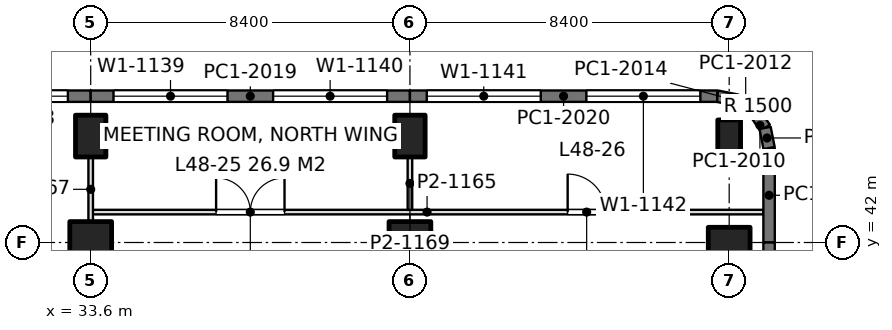
"""IFC4 building model, lengths in metres.
Left out: names, types, materials, properties, quantities, classifications, styles, units other than length and angle.
Written with IfcOpenShell. Run it as: python <this file> out.ifc"""

import sys

from ifc_helpers import new_model, si_unit, direction, frame, frame_2d, origin, origin_2d, place, context, subcontext, project, spatial, rectangle, extrude, element, fill, save


model = new_model("IFC4")
c1 = context("Model", 3, precision=1e-05, world=origin(), true_north=direction((0.0, 1.0)))
c2 = subcontext(c1, "Body", "Model", "MODEL_VIEW")
j1 = project(units=[si_unit("LENGTHUNIT", "METRE"), si_unit("PLANEANGLEUNIT", "RADIAN")], contexts=[c1])
p1 = place(None, origin())
s1 = spatial("IfcSite", under=j1, at=p1, CompositionType="ELEMENT")
p2 = place(p1, origin())
s2 = spatial("IfcBuilding", under=s1, at=p2, CompositionType="ELEMENT")
p3 = place(p2, frame((0.0, 0.0, 211.2)))
s3 = spatial("IfcBuildingStorey", under=s2, at=p3, CompositionType="ELEMENT", Elevation=211.2)
p4 = place(p3, frame((33.6, 42.0, 0.0), z_axis=(0.0, 0.0, 1.0), x_axis=(1.0, 0.0, 0.0)))
e1 = element("IfcColumn", 1, at=p4, inside=s3, PredefinedType="COLUMN", context=c2, shape_type="SweptSolid", body=[
    extrude(rectangle(XDim=1.1, YDim=1.1, at=origin_2d()), origin(), (0.0, 0.0, 1.0), 4.2),
])
p5 = place(p3, frame((33.6, 44.8, 0.0), z_axis=(0.0, 0.0, 1.0), x_axis=(1.0, 0.0, 0.0)))
e2 = element("IfcColumn", 2, at=p5, inside=s3, PredefinedType="COLUMN", context=c2, shape_type="SweptSolid", body=[
    extrude(rectangle(XDim=0.8, YDim=1.1, at=origin_2d()), origin(), (0.0, 0.0, 1.0), 4.2),
])
p6 = place(p3, frame((42.0, 42.0, 0.0), z_axis=(0.0, 0.0, 1.0), x_axis=(1.0, 0.0, 0.0)))
e3 = element("IfcColumn", 3, at=p6, inside=s3, PredefinedType="COLUMN", context=c2, shape_type="SweptSolid", body=[
    extrude(rectangle(XDim=1.1, YDim=1.1, at=origin_2d()), origin(), (0.0, 0.0, 1.0), 4.2),
])
for number, where, z_axis, x_axis in (
    (4, (42.0, 44.8, 0.0), (0.0, 0.0, 1.0), (1.0, 0.0, 0.0)),
    (5, (50.4, 42.0, 0.0), (0.0, 0.0, 1.0), (0.0, 1.0, 0.0)),
):
    element("IfcColumn", number, at=place(p3, frame(where, z_axis=z_axis, x_axis=x_axis)), inside=s3, PredefinedType="COLUMN", context=c2, shape_type="SweptSolid", body=[
        extrude(rectangle(XDim=0.8, YDim=1.1, at=origin_2d()), origin(), (0.0, 0.0, 1.0), 4.2),
    ])
p7 = place(p3, frame((50.4, 44.8, 0.0), z_axis=(0.0, 0.0, 1.0), x_axis=(1.0, 0.0, 0.0)))
e6 = element("IfcColumn", 6, at=p7, inside=s3, PredefinedType="COLUMN", context=c2, shape_type="SweptSolid", body=[
    extrude(rectangle(XDim=0.6, YDim=0.85, at=origin_2d()), origin(), (0.0, 0.0, 1.0), 4.2),
])
p8 = place(p3, frame((25.2, 45.85, 0.0), z_axis=(0.0, 0.0, 1.0), x_axis=(1.0, 0.0, 0.0)))
e7 = element("IfcWall", 7, at=p8, inside=s3, PredefinedType="SOLIDWALL", context=c2, shape_type="SweptSolid", body=[
    extrude(rectangle(XDim=8.4, YDim=0.3, at=frame_2d((4.2, 0.0))), origin(), (0.0, 0.0, 1.0), 4.05),
])
p9 = place(p8, frame((0.6, 0.0, 0.9)))
e8 = element("IfcOpeningElement", 8, at=p9, cuts=e7, PredefinedType="OPENING", context=c2, shape_type="SweptSolid", body=[
    extrude(rectangle(XDim=3.0, YDim=1.9, at=frame_2d((1.5, 0.95))), frame((0.0, 0.16, 0.0), z_axis=(0.0, -1.0, 0.0), x_axis=(1.0, 0.0, 0.0)), (0.0, 0.0, 1.0), 0.32),
])
p10 = place(p8, frame((4.8, 0.0, 0.9)))
e9 = element("IfcOpeningElement", 9, at=p10, cuts=e7, PredefinedType="OPENING", context=c2, shape_type="SweptSolid", body=[
    extrude(rectangle(XDim=3.0, YDim=1.9, at=frame_2d((1.5, 0.95))), frame((0.0, 0.16, 0.0), z_axis=(0.0, -1.0, 0.0), x_axis=(1.0, 0.0, 0.0)), (0.0, 0.0, 1.0), 0.32),
])
p11 = place(p3, frame((33.6, 45.85, 0.0), z_axis=(0.0, 0.0, 1.0), x_axis=(1.0, 0.0, 0.0)))
e10 = element("IfcWall", 10, at=p11, inside=s3, PredefinedType="SOLIDWALL", context=c2, shape_type="SweptSolid", body=[
    extrude(rectangle(XDim=8.4, YDim=0.3, at=frame_2d((4.2, 0.0))), origin(), (0.0, 0.0, 1.0), 4.05),
])
p12 = place(p11, frame((0.6, 0.0, 0.9)))
e11 = element("IfcOpeningElement", 11, at=p12, cuts=e10, PredefinedType="OPENING", context=c2, shape_type="SweptSolid", body=[
    extrude(rectangle(XDim=3.0, YDim=1.9, at=frame_2d((1.5, 0.95))), frame((0.0, 0.16, 0.0), z_axis=(0.0, -1.0, 0.0), x_axis=(1.0, 0.0, 0.0)), (0.0, 0.0, 1.0), 0.32),
])
p13 = place(p11, frame((4.8, 0.0, 0.9)))
e12 = element("IfcOpeningElement", 12, at=p13, cuts=e10, PredefinedType="OPENING", context=c2, shape_type="SweptSolid", body=[
    extrude(rectangle(XDim=3.0, YDim=1.9, at=frame_2d((1.5, 0.95))), frame((0.0, 0.16, 0.0), z_axis=(0.0, -1.0, 0.0), x_axis=(1.0, 0.0, 0.0)), (0.0, 0.0, 1.0), 0.32),
])
p14 = place(p3, frame((42.0, 45.85, 0.0), z_axis=(0.0, 0.0, 1.0), x_axis=(1.0, 0.0, 0.0)))
e13 = element("IfcWall", 13, at=p14, inside=s3, PredefinedType="SOLIDWALL", context=c2, shape_type="SweptSolid", body=[
    extrude(rectangle(XDim=8.085, YDim=0.3, at=frame_2d((4.042, 0.0))), origin(), (0.0, 0.0, 1.0), 4.05),
])
p15 = place(p14, frame((0.443, 0.0, 0.9)))
e14 = element("IfcOpeningElement", 14, at=p15, cuts=e13, PredefinedType="OPENING", context=c2, shape_type="SweptSolid", body=[
    extrude(rectangle(XDim=3.0, YDim=1.9, at=frame_2d((1.5, 0.95))), frame((0.0, 0.16, 0.0), z_axis=(0.0, -1.0, 0.0), x_axis=(1.0, 0.0, 0.0)), (0.0, 0.0, 1.0), 0.32),
])
p16 = place(p14, frame((4.643, 0.0, 0.9)))
e15 = element("IfcOpeningElement", 15, at=p16, cuts=e13, PredefinedType="OPENING", context=c2, shape_type="SweptSolid", body=[
    extrude(rectangle(XDim=3.0, YDim=1.9, at=frame_2d((1.5, 0.95))), frame((0.0, 0.16, 0.0), z_axis=(0.0, -1.0, 0.0), x_axis=(1.0, 0.0, 0.0)), (0.0, 0.0, 1.0), 0.32),
])
p17 = place(p3, frame((50.085, 45.85, 0.0), z_axis=(0.0, 0.0, 1.0), x_axis=(0.980702050465, -0.1955082817, 0.0)))
e16 = element("IfcWall", 16, at=p17, inside=s3, PredefinedType="SOLIDWALL", context=c2, shape_type="SweptSolid", body=[
    extrude(rectangle(XDim=0.541, YDim=0.3, at=frame_2d((0.271, 0.0))), origin(), (0.0, 0.0, 1.0), 4.05),
])
p18 = place(p3, frame((50.615, 45.744, 0.0), z_axis=(0.0, 0.0, 1.0), x_axis=(0.831692711774, -0.555236195849, 0.0)))
e17 = element("IfcWall", 17, at=p18, inside=s3, PredefinedType="SOLIDWALL", context=c2, shape_type="SweptSolid", body=[
    extrude(rectangle(XDim=0.525, YDim=0.3, at=frame_2d((0.263, 0.0))), origin(), (0.0, 0.0, 1.0), 4.05),
])
p19 = place(p3, frame((51.052, 45.453, 0.0), z_axis=(0.0, 0.0, 1.0), x_axis=(0.55534295404, -0.831621430339, 0.0)))
e18 = element("IfcWall", 18, at=p19, inside=s3, PredefinedType="SOLIDWALL", context=c2, shape_type="SweptSolid", body=[
    extrude(rectangle(XDim=0.526, YDim=0.3, at=frame_2d((0.263, 0.0))), origin(), (0.0, 0.0, 1.0), 4.05),
])
p20 = place(p3, frame((51.344, 45.015, 0.0), z_axis=(0.0, 0.0, 1.0), x_axis=(0.195073962632, -0.980788534345, 0.0)))
e19 = element("IfcWall", 19, at=p20, inside=s3, PredefinedType="SOLIDWALL", context=c2, shape_type="SweptSolid", body=[
    extrude(rectangle(XDim=0.541, YDim=0.3, at=frame_2d((0.271, 0.0))), origin(), (0.0, 0.0, 1.0), 4.05),
])
p21 = place(p3, frame((51.45, 44.485, 0.0), z_axis=(0.0, 0.0, 1.0), x_axis=(0.0, -1.0, 0.0)))
e20 = element("IfcWall", 20, at=p21, inside=s3, PredefinedType="SOLIDWALL", context=c2, shape_type="SweptSolid", body=[
    extrude(rectangle(XDim=2.485, YDim=0.3, at=frame_2d((1.243, 0.0))), origin(), (0.0, 0.0, 1.0), 4.05),
])
p22 = place(p3, frame((51.45, 42.0, 0.0), z_axis=(0.0, 0.0, 1.0), x_axis=(0.0, -1.0, 0.0)))
e21 = element("IfcWall", 21, at=p22, inside=s3, PredefinedType="SOLIDWALL", context=c2, shape_type="SweptSolid", body=[
    extrude(rectangle(XDim=4.275, YDim=0.3, at=frame_2d((2.137, 0.0))), origin(), (0.0, 0.0, 1.0), 4.05),
])
p23 = place(p22, frame((0.938, 0.0, 0.9)))
e22 = element("IfcOpeningElement", 22, at=p23, cuts=e21, PredefinedType="OPENING", context=c2, shape_type="SweptSolid", body=[
    extrude(rectangle(XDim=2.4, YDim=1.9, at=frame_2d((1.2, 0.95))), frame((0.0, 0.16, 0.0), z_axis=(0.0, -1.0, 0.0), x_axis=(1.0, 0.0, 0.0)), (0.0, 0.0, 1.0), 0.32),
])
p24 = place(p3, frame((33.6, 42.8, 0.0), z_axis=(0.0, 0.0, 1.0), x_axis=(1.0, 0.0, 0.0)))
e23 = element("IfcWall", 23, at=p24, inside=s3, PredefinedType="PARTITIONING", context=c2, shape_type="SweptSolid", body=[
    extrude(rectangle(XDim=17.702, YDim=0.12, at=frame_2d((8.851, 0.0))), origin(), (0.0, 0.0, 1.0), 3.56),
])
p25 = place(p24, frame((3.3, 0.0, 0.0)))
e24 = element("IfcOpeningElement", 24, at=p25, cuts=e23, PredefinedType="OPENING", context=c2, shape_type="SweptSolid", body=[
    extrude(rectangle(XDim=1.8, YDim=2.2, at=frame_2d((0.9, 1.1))), frame((0.0, 0.07, 0.0), z_axis=(0.0, -1.0, 0.0), x_axis=(1.0, 0.0, 0.0)), (0.0, 0.0, 1.0), 0.14),
])
p26 = place(p24, frame((12.55, 0.0, 0.0)))
e25 = element("IfcOpeningElement", 25, at=p26, cuts=e23, PredefinedType="OPENING", context=c2, shape_type="SweptSolid", body=[
    extrude(rectangle(XDim=1.0, YDim=2.4, at=frame_2d((0.5, 1.2))), frame((0.0, 0.07, 0.0), z_axis=(0.0, -1.0, 0.0), x_axis=(1.0, 0.0, 0.0)), (0.0, 0.0, 1.0), 0.14),
])
p27 = place(p3, frame((33.6, 42.548, 0.0), z_axis=(0.0, 0.0, 1.0), x_axis=(0.0, 1.0, 0.0)))
e26 = element("IfcWall", 26, at=p27, inside=s3, PredefinedType="PARTITIONING", context=c2, shape_type="SweptSolid", body=[
    extrude(rectangle(XDim=1.703, YDim=0.12, at=frame_2d((0.852, 0.0))), origin(), (0.0, 0.0, 1.0), 3.69),
])
p28 = place(p3, frame((42.0, 42.858, 0.0), z_axis=(0.0, 0.0, 1.0), x_axis=(0.0, 1.0, 0.0)))
e27 = element("IfcWall", 27, at=p28, inside=s3, PredefinedType="PARTITIONING", context=c2, shape_type="SweptSolid", body=[
    extrude(rectangle(XDim=1.393, YDim=0.12, at=frame_2d((0.697, 0.0))), origin(), (0.0, 0.0, 1.0), 3.69),
])
p29 = place(p10, origin())
e28 = element("IfcWindow", 28, at=p29, inside=s3, PartitioningType="SINGLE_PANEL", PredefinedType="WINDOW", context=c2, shape_type="SweptSolid", body=[
    extrude(rectangle(XDim=3.0, YDim=1.9, at=frame_2d((1.5, 0.95))), frame((0.0, 0.03, 0.0), z_axis=(0.0, -1.0, 0.0), x_axis=(1.0, 0.0, 0.0)), (0.0, 0.0, 1.0), 0.06),
])
fill(e9, e28)
p30 = place(p12, origin())
e29 = element("IfcWindow", 29, at=p30, inside=s3, PartitioningType="SINGLE_PANEL", PredefinedType="WINDOW", context=c2, shape_type="SweptSolid", body=[
    extrude(rectangle(XDim=3.0, YDim=1.9, at=frame_2d((1.5, 0.95))), frame((0.0, 0.03, 0.0), z_axis=(0.0, -1.0, 0.0), x_axis=(1.0, 0.0, 0.0)), (0.0, 0.0, 1.0), 0.06),
])
fill(e11, e29)
p31 = place(p13, origin())
e30 = element("IfcWindow", 30, at=p31, inside=s3, PartitioningType="SINGLE_PANEL", PredefinedType="WINDOW", context=c2, shape_type="SweptSolid", body=[
    extrude(rectangle(XDim=3.0, YDim=1.9, at=frame_2d((1.5, 0.95))), frame((0.0, 0.03, 0.0), z_axis=(0.0, -1.0, 0.0), x_axis=(1.0, 0.0, 0.0)), (0.0, 0.0, 1.0), 0.06),
])
fill(e12, e30)
p32 = place(p15, origin())
e31 = element("IfcWindow", 31, at=p32, inside=s3, PartitioningType="SINGLE_PANEL", PredefinedType="WINDOW", context=c2, shape_type="SweptSolid", body=[
    extrude(rectangle(XDim=3.0, YDim=1.9, at=frame_2d((1.5, 0.95))), frame((0.0, 0.03, 0.0), z_axis=(0.0, -1.0, 0.0), x_axis=(1.0, 0.0, 0.0)), (0.0, 0.0, 1.0), 0.06),
])
fill(e14, e31)
p33 = place(p16, origin())
e32 = element("IfcWindow", 32, at=p33, inside=s3, PartitioningType="SINGLE_PANEL", PredefinedType="WINDOW", context=c2, shape_type="SweptSolid", body=[
    extrude(rectangle(XDim=3.0, YDim=1.9, at=frame_2d((1.5, 0.95))), frame((0.0, 0.03, 0.0), z_axis=(0.0, -1.0, 0.0), x_axis=(1.0, 0.0, 0.0)), (0.0, 0.0, 1.0), 0.06),
])
fill(e15, e32)
p34 = place(p25, origin())
e33 = element("IfcDoor", 33, at=p34, inside=s3, OperationType="DOUBLE_DOOR_SINGLE_SWING", PredefinedType="DOOR", context=c2, shape_type="SweptSolid", body=[
    extrude(rectangle(XDim=1.8, YDim=2.2, at=frame_2d((0.9, 1.1))), frame((0.0, 0.025, 0.0), z_axis=(0.0, -1.0, 0.0), x_axis=(1.0, 0.0, 0.0)), (0.0, 0.0, 1.0), 0.05),
])
fill(e24, e33)
p35 = place(p26, origin())
e34 = element("IfcDoor", 34, at=p35, inside=s3, OperationType="SINGLE_SWING_LEFT", PredefinedType="DOOR", context=c2, shape_type="SweptSolid", body=[
    extrude(rectangle(XDim=1.0, YDim=2.4, at=frame_2d((0.5, 1.2))), frame((0.0, 0.025, 0.0), z_axis=(0.0, -1.0, 0.0), x_axis=(1.0, 0.0, 0.0)), (0.0, 0.0, 1.0), 0.05),
])
fill(e25, e34)
save(model, sys.argv[1])
